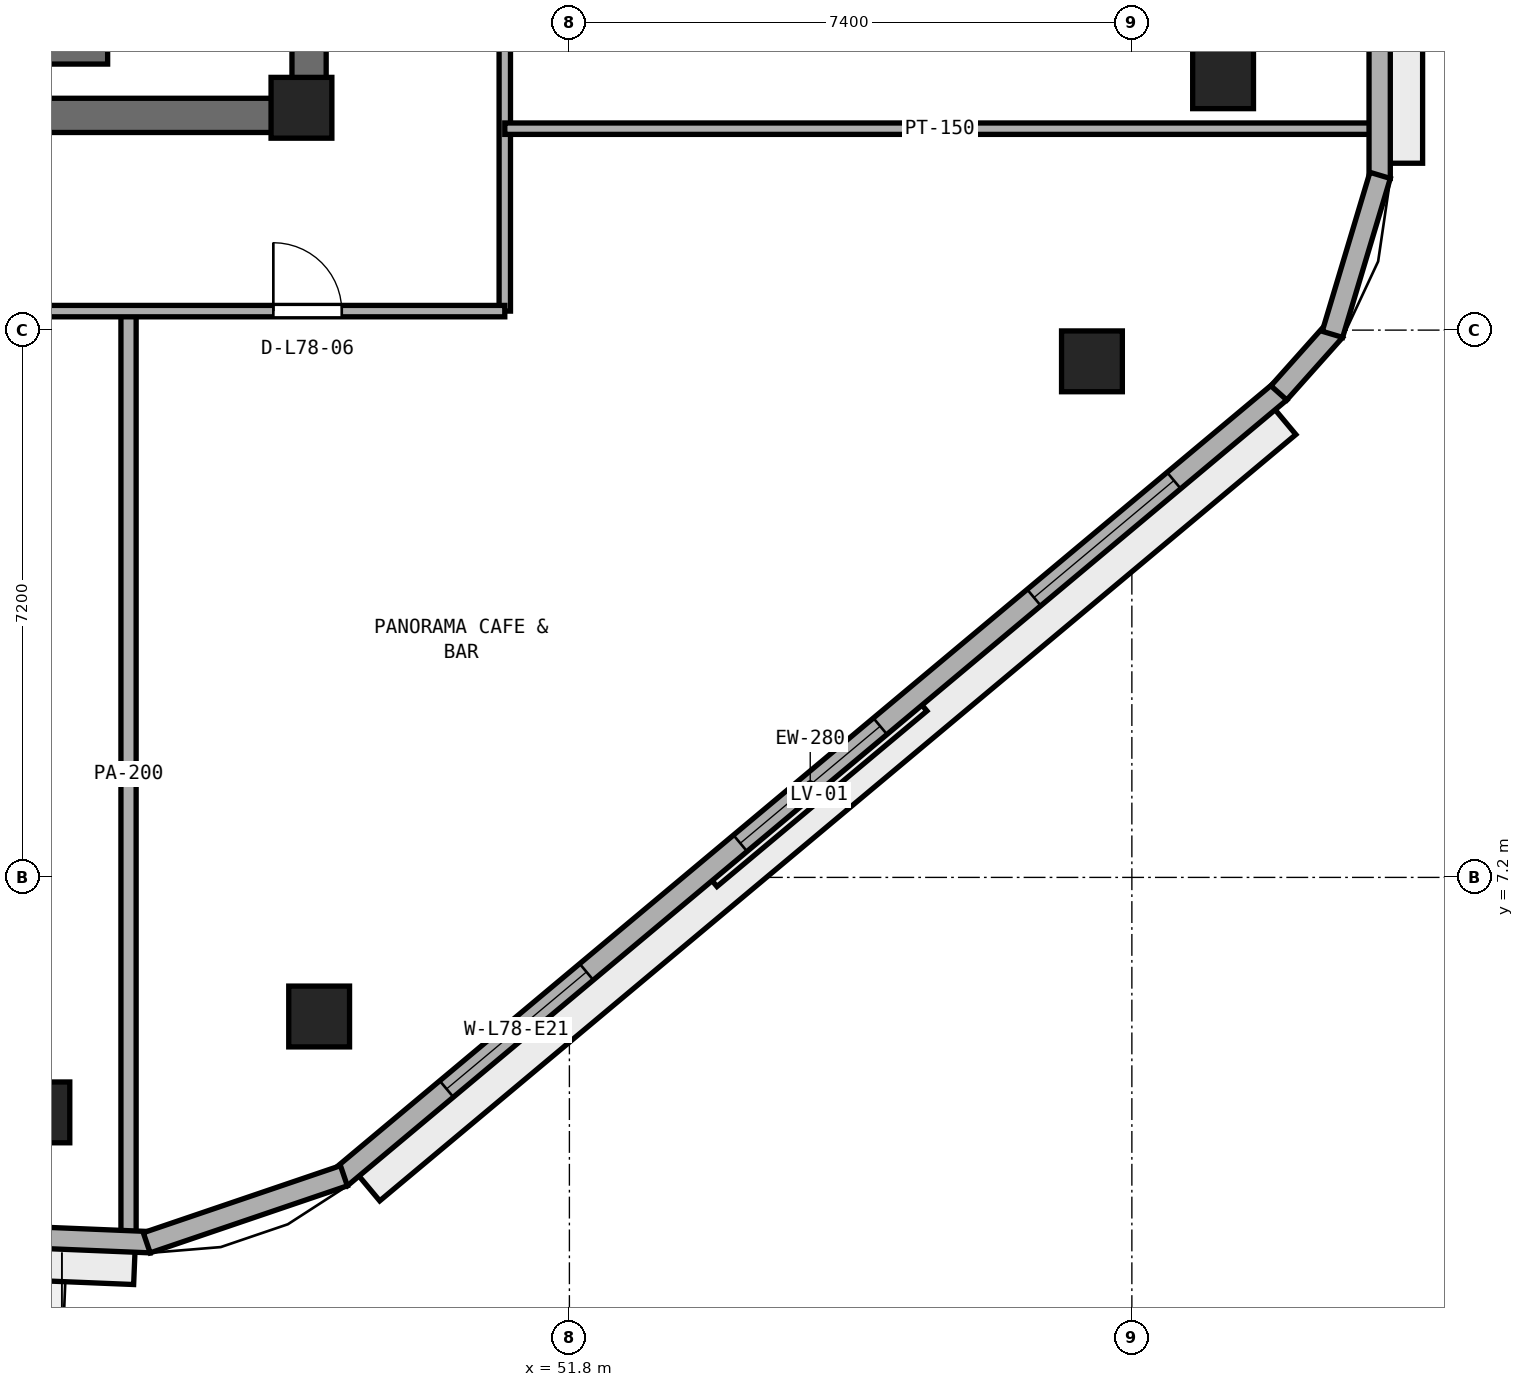
"""IFC4 building model, lengths in metres.
Left out: names, types, materials, properties, quantities, classifications, styles, units other than length and angle.
Written with IfcOpenShell. Run it as: python <this file> out.ifc"""

import sys

from ifc_helpers import new_model, si_unit, direction, frame, frame_2d, origin, origin_2d, place, context, subcontext, project, spatial, rectangle, extrude, element, fill, save


model = new_model("IFC4")
c1 = context("Model", 3, precision=1e-05, world=origin(), true_north=direction((0.0, 1.0)))
c2 = subcontext(c1, "Body", "Model", "MODEL_VIEW")
j1 = project(units=[si_unit("LENGTHUNIT", "METRE"), si_unit("PLANEANGLEUNIT", "RADIAN")], contexts=[c1])
p1 = place(None, origin())
s1 = spatial("IfcSite", under=j1, at=p1, CompositionType="ELEMENT")
p2 = place(p1, origin())
s2 = spatial("IfcBuilding", under=s1, at=p2, CompositionType="ELEMENT")
p3 = place(p2, frame((0.0, 0.0, 304.8)))
s3 = spatial("IfcBuildingStorey", under=s2, at=p3, CompositionType="ELEMENT", Elevation=304.8)
p4 = place(p3, frame((25.4, 17.225, 0.0), z_axis=(0.0, 0.0, 1.0), x_axis=(1.0, 0.0, 0.0)))
e1 = element("IfcWall", 1, at=p4, inside=s3, PredefinedType="SHEAR", context=c2, shape_type="SweptSolid", body=[
    extrude(rectangle(XDim=23.2, YDim=0.45, at=frame_2d((11.6, 0.0))), origin(), (0.0, 0.0, 1.0), 3.4),
])
p5 = place(p3, frame((48.375, 17.45, 0.0), z_axis=(0.0, 0.0, 1.0), x_axis=(0.0, 1.0, 0.0)))
e2 = element("IfcWall", 2, at=p5, inside=s3, PredefinedType="SHEAR", context=c2, shape_type="SweptSolid", body=[
    extrude(rectangle(XDim=15.5, YDim=0.45, at=frame_2d((7.75, 0.0))), origin(), (0.0, 0.0, 1.0), 3.4),
])
p6 = place(p5, frame((5.85, 0.0, 0.0)))
e3 = element("IfcOpeningElement", 3, at=p6, cuts=e2, PredefinedType="OPENING", context=c2, shape_type="SweptSolid", body=[
    extrude(rectangle(XDim=1.5, YDim=2.15, at=frame_2d((0.75, 1.075))), frame((0.0, 0.235, 0.0), z_axis=(0.0, -1.0, 0.0), x_axis=(1.0, 0.0, 0.0)), (0.0, 0.0, 1.0), 0.47),
])
p7 = place(p3, frame((48.275, 17.325, 0.0), z_axis=(0.0, 0.0, 1.0), x_axis=(1.0, 0.0, 0.0)))
e4 = element("IfcColumn", 4, at=p7, inside=s3, PredefinedType="PILASTER", context=c2, shape_type="SweptSolid", body=[
    extrude(rectangle(XDim=0.8, YDim=0.8, at=origin_2d()), origin(), (0.0, 0.0, 1.0), 3.8),
])
for number, where, z_axis, x_axis in (
    (5, (44.827, 4.108, 0.0), (0.0, 0.0, 1.0), (1.0, 0.0, 0.0)),
    (6, (48.508, 5.37, 0.0), (0.0, 0.0, 1.0), (1.0, 0.0, 0.0)),
    (7, (58.675, 13.989, 0.0), (0.0, 0.0, 1.0), (1.0, 0.0, 0.0)),
    (8, (60.4, 17.714, 0.0), (0.0, 0.0, 1.0), (1.0, 0.0, 0.0)),
):
    element("IfcColumn", number, at=place(p3, frame(where, z_axis=z_axis, x_axis=x_axis)), inside=s3, PredefinedType="COLUMN", context=c2, shape_type="SweptSolid", body=[
        extrude(rectangle(XDim=0.8, YDim=0.8, at=origin_2d()), origin(), (0.0, 0.0, 1.0), 3.8),
    ])
p8 = place(p3, frame((38.425, 18.025, 0.0), z_axis=(0.0, 0.0, 1.0), x_axis=(1.0, 0.0, 0.0)))
e9 = element("IfcWall", 9, at=p8, inside=s3, PredefinedType="SHEAR", context=c2, shape_type="SweptSolid", body=[
    extrude(rectangle(XDim=7.3, YDim=0.25, at=frame_2d((3.65, 0.0))), origin(), (0.0, 0.0, 1.0), 3.4),
])
p9 = place(p3, frame((50.95, 14.65, 0.0), z_axis=(0.0, 0.0, 1.0), x_axis=(0.0, 1.0, 0.0)))
e10 = element("IfcWall", 10, at=p9, inside=s3, PredefinedType="PARTITIONING", context=c2, shape_type="SweptSolid", body=[
    extrude(rectangle(XDim=13.15, YDim=0.15, at=frame_2d((6.575, 0.0))), origin(), (0.0, 0.0, 1.0), 3.4),
])
p10 = place(p9, frame((4.275, 0.0, 0.0)))
e11 = element("IfcOpeningElement", 11, at=p10, cuts=e10, PredefinedType="OPENING", context=c2, shape_type="SweptSolid", body=[
    extrude(rectangle(XDim=0.9, YDim=2.1, at=frame_2d((0.45, 1.05))), frame((0.0, 0.085, 0.0), z_axis=(0.0, -1.0, 0.0), x_axis=(1.0, 0.0, 0.0)), (0.0, 0.0, 1.0), 0.17),
])
p11 = place(p9, frame((9.53, 0.0, 0.0)))
e12 = element("IfcOpeningElement", 12, at=p11, cuts=e10, PredefinedType="OPENING", context=c2, shape_type="SweptSolid", body=[
    extrude(rectangle(XDim=0.9, YDim=2.1, at=frame_2d((0.45, 1.05))), frame((0.0, 0.085, 0.0), z_axis=(0.0, -1.0, 0.0), x_axis=(1.0, 0.0, 0.0)), (0.0, 0.0, 1.0), 0.17),
])
p12 = place(p3, frame((46.0, 2.477, 0.0), z_axis=(0.0, 0.0, 1.0), x_axis=(0.0, 1.0, 0.0)))
e13 = element("IfcWall", 13, at=p12, inside=s3, PredefinedType="PARTITIONING", context=c2, shape_type="SweptSolid", body=[
    extrude(rectangle(XDim=12.173, YDim=0.2, at=frame_2d((6.086, 0.0))), origin(), (0.0, 0.0, 1.0), 3.4),
])
p13 = place(p3, frame((38.35, 14.65, 0.0), z_axis=(0.0, 0.0, 1.0), x_axis=(1.0, 0.0, 0.0)))
e14 = element("IfcWall", 14, at=p13, inside=s3, PredefinedType="PARTITIONING", context=c2, shape_type="SweptSolid", body=[
    extrude(rectangle(XDim=12.6, YDim=0.15, at=frame_2d((6.3, 0.0))), origin(), (0.0, 0.0, 1.0), 3.4),
])
p14 = place(p13, frame((9.555, 0.0, 0.0)))
e15 = element("IfcOpeningElement", 15, at=p14, cuts=e14, PredefinedType="OPENING", context=c2, shape_type="SweptSolid", body=[
    extrude(rectangle(XDim=0.9, YDim=2.1, at=frame_2d((0.45, 1.05))), frame((0.0, 0.085, 0.0), z_axis=(0.0, -1.0, 0.0), x_axis=(1.0, 0.0, 0.0)), (0.0, 0.0, 1.0), 0.17),
])
p15 = place(p3, frame((50.95, 17.05, 0.0), z_axis=(0.0, 0.0, 1.0), x_axis=(1.0, 0.0, 0.0)))
e16 = element("IfcWall", 16, at=p15, inside=s3, PredefinedType="PARTITIONING", context=c2, shape_type="SweptSolid", body=[
    extrude(rectangle(XDim=11.445, YDim=0.15, at=frame_2d((5.723, 0.0))), origin(), (0.0, 0.0, 1.0), 3.4),
])
p16 = place(p3, frame((29.428, 3.093, 0.0), z_axis=(0.0, 0.0, 1.0), x_axis=(0.999156257967, -0.041070331944, 0.0)))
e17 = element("IfcWall", 17, at=p16, inside=s3, PredefinedType="STANDARD", context=c2, shape_type="SweptSolid", body=[
    extrude(rectangle(XDim=16.876, YDim=0.28, at=frame_2d((8.438, 0.0))), origin(), (0.0, 0.0, 1.0), 3.4),
])
p17 = place(p16, frame((7.588, 0.0, 0.0)))
e18 = element("IfcOpeningElement", 18, at=p17, cuts=e17, PredefinedType="OPENING", context=c2, shape_type="SweptSolid", body=[
    extrude(rectangle(XDim=1.1, YDim=2.2, at=frame_2d((0.55, 1.1))), frame((0.0, 0.15, 0.0), z_axis=(0.0, -1.0, 0.0), x_axis=(1.0, 0.0, 0.0)), (0.0, 0.0, 1.0), 0.3),
])
p18 = place(p16, frame((1.946, 0.0, 0.9)))
e19 = element("IfcOpeningElement", 19, at=p18, cuts=e17, PredefinedType="OPENING", context=c2, shape_type="SweptSolid", body=[
    extrude(rectangle(XDim=2.4, YDim=1.75, at=frame_2d((1.2, 0.875))), frame((0.0, 0.15, 0.0), z_axis=(0.0, -1.0, 0.0), x_axis=(1.0, 0.0, 0.0)), (0.0, 0.0, 1.0), 0.3),
])
p19 = place(p16, frame((12.53, 0.0, 0.9)))
e20 = element("IfcOpeningElement", 20, at=p19, cuts=e17, PredefinedType="OPENING", context=c2, shape_type="SweptSolid", body=[
    extrude(rectangle(XDim=2.4, YDim=1.75, at=frame_2d((1.2, 0.875))), frame((0.0, 0.15, 0.0), z_axis=(0.0, -1.0, 0.0), x_axis=(1.0, 0.0, 0.0)), (0.0, 0.0, 1.0), 0.3),
])
p20 = place(p3, frame((48.789, 3.25, 0.0), z_axis=(0.0, 0.0, 1.0), x_axis=(0.767032672101, 0.641608042288, 0.0)))
e21 = element("IfcWall", 21, at=p20, inside=s3, PredefinedType="STANDARD", context=c2, shape_type="SweptSolid", body=[
    extrude(rectangle(XDim=16.113, YDim=0.28, at=frame_2d((8.057, 0.0))), origin(), (0.0, 0.0, 1.0), 3.4),
])
p21 = place(p20, frame((1.819, 0.0, 0.9)))
e22 = element("IfcOpeningElement", 22, at=p21, cuts=e21, PredefinedType="OPENING", context=c2, shape_type="SweptSolid", body=[
    extrude(rectangle(XDim=2.4, YDim=1.75, at=frame_2d((1.2, 0.875))), frame((0.0, 0.15, 0.0), z_axis=(0.0, -1.0, 0.0), x_axis=(1.0, 0.0, 0.0)), (0.0, 0.0, 1.0), 0.3),
])
p22 = place(p20, frame((6.857, 0.0, 0.9)))
e23 = element("IfcOpeningElement", 23, at=p22, cuts=e21, PredefinedType="OPENING", context=c2, shape_type="SweptSolid", body=[
    extrude(rectangle(XDim=2.4, YDim=1.75, at=frame_2d((1.2, 0.875))), frame((0.0, 0.15, 0.0), z_axis=(0.0, -1.0, 0.0), x_axis=(1.0, 0.0, 0.0)), (0.0, 0.0, 1.0), 0.3),
])
p23 = place(p20, frame((11.895, 0.0, 0.9)))
e24 = element("IfcOpeningElement", 24, at=p23, cuts=e21, PredefinedType="OPENING", context=c2, shape_type="SweptSolid", body=[
    extrude(rectangle(XDim=2.4, YDim=1.75, at=frame_2d((1.2, 0.875))), frame((0.0, 0.15, 0.0), z_axis=(0.0, -1.0, 0.0), x_axis=(1.0, 0.0, 0.0)), (0.0, 0.0, 1.0), 0.3),
])
p24 = place(p3, frame((62.46, 16.396, 0.0), z_axis=(0.0, 0.0, 1.0), x_axis=(0.0, 1.0, 0.0)))
e25 = element("IfcWall", 25, at=p24, inside=s3, PredefinedType="STANDARD", context=c2, shape_type="SweptSolid", body=[
    extrude(rectangle(XDim=18.854, YDim=0.28, at=frame_2d((9.427, 0.0))), origin(), (0.0, 0.0, 1.0), 3.4),
])
p25 = place(p24, frame((2.276, 0.0, 0.9)))
e26 = element("IfcOpeningElement", 26, at=p25, cuts=e25, PredefinedType="OPENING", context=c2, shape_type="SweptSolid", body=[
    extrude(rectangle(XDim=2.4, YDim=1.75, at=frame_2d((1.2, 0.875))), frame((0.0, 0.15, 0.0), z_axis=(0.0, -1.0, 0.0), x_axis=(1.0, 0.0, 0.0)), (0.0, 0.0, 1.0), 0.3),
])
p26 = place(p24, frame((8.227, 0.0, 0.9)))
e27 = element("IfcOpeningElement", 27, at=p26, cuts=e25, PredefinedType="OPENING", context=c2, shape_type="SweptSolid", body=[
    extrude(rectangle(XDim=2.4, YDim=1.75, at=frame_2d((1.2, 0.875))), frame((0.0, 0.15, 0.0), z_axis=(0.0, -1.0, 0.0), x_axis=(1.0, 0.0, 0.0)), (0.0, 0.0, 1.0), 0.3),
])
p27 = place(p24, frame((14.179, 0.0, 0.9)))
e28 = element("IfcOpeningElement", 28, at=p27, cuts=e25, PredefinedType="OPENING", context=c2, shape_type="SweptSolid", body=[
    extrude(rectangle(XDim=2.4, YDim=1.75, at=frame_2d((1.2, 0.875))), frame((0.0, 0.15, 0.0), z_axis=(0.0, -1.0, 0.0), x_axis=(1.0, 0.0, 0.0)), (0.0, 0.0, 1.0), 0.3),
])
p28 = place(p3, frame((46.24, 2.393, 0.0), z_axis=(0.0, 0.0, 1.0), x_axis=(0.946759165502, 0.321942669643, 0.0)))
e29 = element("IfcWall", 29, at=p28, inside=s3, PredefinedType="STANDARD", context=c2, shape_type="SweptSolid", body=[
    extrude(rectangle(XDim=2.74, YDim=0.28, at=frame_2d((1.37, 0.0))), origin(), (0.0, 0.0, 1.0), 3.4),
])
p29 = place(p3, frame((61.134, 13.574, 0.0), z_axis=(0.0, 0.0, 1.0), x_axis=(0.665804679247, 0.74612608123, 0.0)))
e30 = element("IfcWall", 30, at=p29, inside=s3, PredefinedType="STANDARD", context=c2, shape_type="SweptSolid", body=[
    extrude(rectangle(XDim=1.103, YDim=0.28, at=frame_2d((0.552, 0.0))), origin(), (0.0, 0.0, 1.0), 3.4),
])
p30 = place(p3, frame((61.839, 14.344, 0.0), z_axis=(0.0, 0.0, 1.0), x_axis=(0.287235049694, 0.957860128739, 0.0)))
e31 = element("IfcWall", 31, at=p30, inside=s3, PredefinedType="STANDARD", context=c2, shape_type="SweptSolid", body=[
    extrude(rectangle(XDim=2.184, YDim=0.28, at=frame_2d((1.092, 0.0))), origin(), (0.0, 0.0, 1.0), 3.4),
])
p31 = place(p14, origin())
e32 = element("IfcDoor", 32, at=p31, inside=s3, OperationType="SINGLE_SWING_LEFT", PredefinedType="DOOR", context=c2, shape_type="SweptSolid", body=[
    extrude(rectangle(XDim=0.9, YDim=2.1, at=frame_2d((0.45, 1.05))), frame((0.0, 0.025, 0.0), z_axis=(0.0, -1.0, 0.0), x_axis=(1.0, 0.0, 0.0)), (0.0, 0.0, 1.0), 0.05),
])
fill(e15, e32)
p32 = place(p21, origin())
e33 = element("IfcWindow", 33, at=p32, inside=s3, PartitioningType="SINGLE_PANEL", PredefinedType="WINDOW", context=c2, shape_type="SweptSolid", body=[
    extrude(rectangle(XDim=2.4, YDim=1.75, at=frame_2d((1.2, 0.875))), frame((0.0, 0.03, 0.0), z_axis=(0.0, -1.0, 0.0), x_axis=(1.0, 0.0, 0.0)), (0.0, 0.0, 1.0), 0.06),
])
fill(e22, e33)
p33 = place(p22, origin())
e34 = element("IfcWindow", 34, at=p33, inside=s3, PartitioningType="SINGLE_PANEL", PredefinedType="WINDOW", context=c2, shape_type="SweptSolid", body=[
    extrude(rectangle(XDim=2.4, YDim=1.75, at=frame_2d((1.2, 0.875))), frame((0.0, 0.03, 0.0), z_axis=(0.0, -1.0, 0.0), x_axis=(1.0, 0.0, 0.0)), (0.0, 0.0, 1.0), 0.06),
])
fill(e23, e34)
p34 = place(p23, origin())
e35 = element("IfcWindow", 35, at=p34, inside=s3, PartitioningType="SINGLE_PANEL", PredefinedType="WINDOW", context=c2, shape_type="SweptSolid", body=[
    extrude(rectangle(XDim=2.4, YDim=1.75, at=frame_2d((1.2, 0.875))), frame((0.0, 0.03, 0.0), z_axis=(0.0, -1.0, 0.0), x_axis=(1.0, 0.0, 0.0)), (0.0, 0.0, 1.0), 0.06),
])
fill(e24, e35)
save(model, sys.argv[1])
